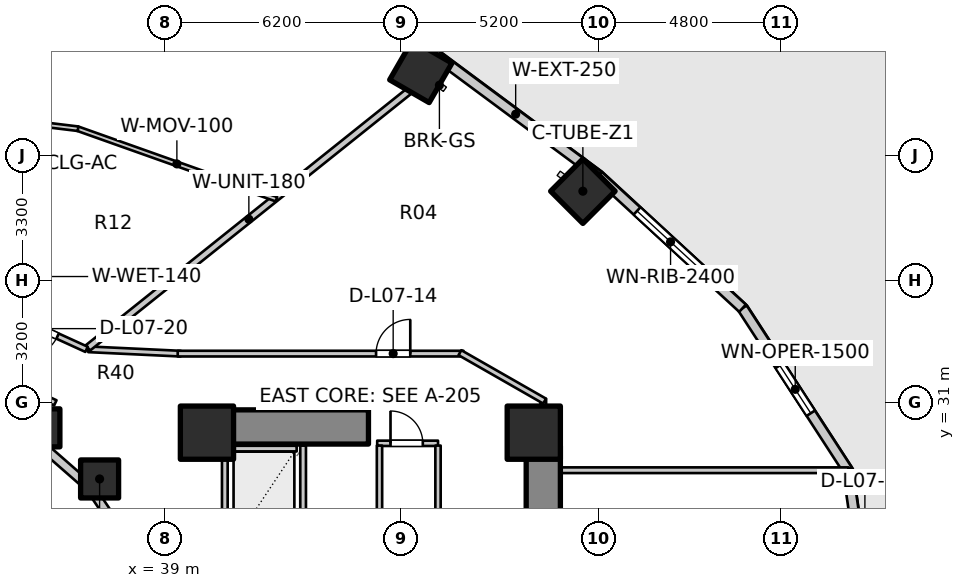
"""IFC4 building model, lengths in metres.
Left out: names, types, materials, properties, quantities, classifications, styles, units other than length and angle.
Written with IfcOpenShell. Run it as: python <this file> out.ifc"""

import sys

from ifc_helpers import new_model, si_unit, direction, frame, frame_2d, origin, origin_2d, place, context, subcontext, project, spatial, rectangle, extrude, element, fill, save


model = new_model("IFC4")
c1 = context("Model", 3, precision=1e-05, world=origin(), true_north=direction((0.0, 1.0)))
c2 = subcontext(c1, "Body", "Model", "MODEL_VIEW")
j1 = project(units=[si_unit("LENGTHUNIT", "METRE"), si_unit("PLANEANGLEUNIT", "RADIAN")], contexts=[c1])
p1 = place(None, origin())
s1 = spatial("IfcSite", under=j1, at=p1, CompositionType="ELEMENT")
p2 = place(p1, origin())
s2 = spatial("IfcBuilding", under=s1, at=p2, CompositionType="ELEMENT")
p3 = place(p2, frame((0.0, 0.0, 27.6)))
s3 = spatial("IfcBuildingStorey", under=s2, at=p3, CompositionType="ELEMENT", Elevation=27.6)
p4 = place(p3, frame((48.95, 17.05, 0.0), z_axis=(0.0, 0.0, 1.0), x_axis=(0.0, 1.0, 0.0)))
e1 = element("IfcWall", 1, at=p4, inside=s3, PredefinedType="SHEAR", context=c2, shape_type="SweptSolid", body=[
    extrude(rectangle(XDim=12.8, YDim=0.9, at=frame_2d((6.4, 0.0))), origin(), (0.0, 0.0, 1.0), 3.1),
])
p5 = place(p3, frame((39.85, 30.35, 0.0), z_axis=(0.0, 0.0, 1.0), x_axis=(1.0, 0.0, 0.0)))
e2 = element("IfcWall", 2, at=p5, inside=s3, PredefinedType="SHEAR", context=c2, shape_type="SweptSolid", body=[
    extrude(rectangle(XDim=4.5, YDim=0.9, at=frame_2d((2.25, 0.0))), origin(), (0.0, 0.0, 1.0), 3.1),
])
for number, where, z_axis, x_axis in (
    (3, (48.7, 30.2, 0.0), (0.0, 0.0, 1.0), (1.0, 0.0, 0.0)),
    (4, (40.1, 30.2, 0.0), (0.0, 0.0, 1.0), (1.0, 0.0, 0.0)),
):
    element("IfcColumn", number, at=place(p3, frame(where, z_axis=z_axis, x_axis=x_axis)), inside=s3, PredefinedType="COLUMN", context=c2, shape_type="SweptSolid", body=[
        extrude(rectangle(XDim=1.4, YDim=1.4, at=origin_2d()), origin(), (0.0, 0.0, 1.0), 3.1),
    ])
p6 = place(p3, frame((37.275, 28.982, 0.0), z_axis=(0.0, 0.0, 1.0), x_axis=(1.0, 0.0, 0.0)))
e5 = element("IfcColumn", 5, at=p6, inside=s3, PredefinedType="COLUMN", context=c2, shape_type="SweptSolid", body=[
    extrude(rectangle(XDim=1.0, YDim=1.0, at=origin_2d()), origin(), (0.0, 0.0, 1.0), 3.1),
])
p7 = place(p3, frame((49.992, 36.554, 0.0), z_axis=(0.0, 0.0, 1.0), x_axis=(0.707106781187, 0.707106781187, 0.0)))
e6 = element("IfcColumn", 6, at=p7, inside=s3, PredefinedType="COLUMN", context=c2, shape_type="SweptSolid", body=[
    extrude(rectangle(XDim=1.2, YDim=1.2, at=origin_2d()), origin(), (0.0, 0.0, 1.0), 3.1),
])
p8 = place(p3, frame((35.73, 30.327, 0.0), z_axis=(0.0, 0.0, 1.0), x_axis=(1.0, 0.0, 0.0)))
e7 = element("IfcColumn", 7, at=p8, inside=s3, PredefinedType="COLUMN", context=c2, shape_type="SweptSolid", body=[
    extrude(rectangle(XDim=1.0, YDim=1.0, at=origin_2d()), origin(), (0.0, 0.0, 1.0), 3.1),
])
p9 = place(p3, frame((45.727, 39.704, 0.0), z_axis=(0.0, 0.0, 1.0), x_axis=(0.5, 0.866025403784, 0.0)))
e8 = element("IfcColumn", 8, at=p9, inside=s3, PredefinedType="COLUMN", context=c2, shape_type="SweptSolid", body=[
    extrude(rectangle(XDim=1.2, YDim=1.2, at=origin_2d()), origin(), (0.0, 0.0, 1.0), 3.1),
])
p10 = place(p3, frame((38.166, 27.06, 0.0), z_axis=(0.0, 0.0, 1.0), x_axis=(-0.558197800898, 0.829707909492, 0.0)))
e9 = element("IfcWall", 9, at=p10, inside=s3, PredefinedType="STANDARD", context=c2, shape_type="SweptSolid", body=[
    extrude(rectangle(XDim=2.027, YDim=0.23, at=frame_2d((1.013, 0.0))), origin(), (0.0, 0.0, 1.0), 2.16),
])
p11 = place(p3, frame((37.035, 28.742, 0.0), z_axis=(0.0, 0.0, 1.0), x_axis=(-0.752576694707, 0.658504607869, 0.0)))
e10 = element("IfcWall", 10, at=p11, inside=s3, PredefinedType="STANDARD", context=c2, shape_type="SweptSolid", body=[
    extrude(rectangle(XDim=1.959, YDim=0.23, at=frame_2d((0.98, 0.0))), origin(), (0.0, 0.0, 1.0), 2.16),
])
p12 = place(p3, frame((57.86, 23.0, 0.0), z_axis=(0.0, 0.0, 1.0), x_axis=(-0.142528001686, 0.989790770181, 0.0)))
e11 = element("IfcWall", 11, at=p12, inside=s3, PredefinedType="STANDARD", context=c2, shape_type="SweptSolid", body=[
    extrude(rectangle(XDim=6.269, YDim=0.26, at=frame_2d((3.135, 0.0))), origin(), (0.0, 0.0, 1.0), 2.88),
])
p13 = place(p12, frame((2.235, 0.0, 0.0)))
e12 = element("IfcOpeningElement", 12, at=p13, cuts=e11, PredefinedType="OPENING", context=c2, shape_type="SweptSolid", body=[
    extrude(rectangle(XDim=1.8, YDim=2.35, at=frame_2d((0.9, 1.175))), frame((0.0, 0.14, 0.0), z_axis=(0.0, -1.0, 0.0), x_axis=(1.0, 0.0, 0.0)), (0.0, 0.0, 1.0), 0.28),
])
p14 = place(p3, frame((56.967, 29.205, 0.0), z_axis=(0.0, 0.0, 1.0), x_axis=(-0.544578722263, 0.838709732421, 0.0)))
e13 = element("IfcWall", 13, at=p14, inside=s3, PredefinedType="STANDARD", context=c2, shape_type="SweptSolid", body=[
    extrude(rectangle(XDim=5.092, YDim=0.26, at=frame_2d((2.546, 0.0))), origin(), (0.0, 0.0, 1.0), 2.85),
])
p15 = place(p14, frame((1.796, 0.0, 0.75)))
e14 = element("IfcOpeningElement", 14, at=p15, cuts=e13, PredefinedType="OPENING", context=c2, shape_type="SweptSolid", body=[
    extrude(rectangle(XDim=1.5, YDim=1.6, at=frame_2d((0.75, 0.8))), frame((0.0, 0.14, 0.0), z_axis=(0.0, -1.0, 0.0), x_axis=(1.0, 0.0, 0.0)), (0.0, 0.0, 1.0), 0.28),
])
p16 = place(p3, frame((54.194, 33.476, 0.0), z_axis=(0.0, 0.0, 1.0), x_axis=(-0.735655109293, 0.67735630223, 0.0)))
e15 = element("IfcWall", 15, at=p16, inside=s3, PredefinedType="STANDARD", context=c2, shape_type="SweptSolid", body=[
    extrude(rectangle(XDim=5.151, YDim=0.26, at=frame_2d((2.575, 0.0))), origin(), (0.0, 0.0, 1.0), 2.85),
])
p17 = place(p16, frame((1.375, 0.0, 0.75)))
e16 = element("IfcOpeningElement", 16, at=p17, cuts=e15, PredefinedType="OPENING", context=c2, shape_type="SweptSolid", body=[
    extrude(rectangle(XDim=2.4, YDim=1.7, at=frame_2d((1.2, 0.85))), frame((0.0, 0.14, 0.0), z_axis=(0.0, -1.0, 0.0), x_axis=(1.0, 0.0, 0.0)), (0.0, 0.0, 1.0), 0.28),
])
p18 = place(p3, frame((50.405, 36.965, 0.0), z_axis=(0.0, 0.0, 1.0), x_axis=(-0.803477531792, 0.595335078679, 0.0)))
e17 = element("IfcWall", 17, at=p18, inside=s3, PredefinedType="STANDARD", context=c2, shape_type="SweptSolid", body=[
    extrude(rectangle(XDim=5.43, YDim=0.26, at=frame_2d((2.715, 0.0))), origin(), (0.0, 0.0, 1.0), 2.85),
])
p19 = place(p3, frame((46.042, 40.197, 0.0), z_axis=(0.0, 0.0, 1.0), x_axis=(-0.919612132394, 0.39282760335, 0.0)))
e18 = element("IfcWall", 18, at=p19, inside=s3, PredefinedType="STANDARD", context=c2, shape_type="SweptSolid", body=[
    extrude(rectangle(XDim=6.209, YDim=0.26, at=frame_2d((3.105, 0.0))), origin(), (0.0, 0.0, 1.0), 2.85),
])
p20 = place(p19, frame((2.355, 0.0, 0.75)))
e19 = element("IfcOpeningElement", 19, at=p20, cuts=e18, PredefinedType="OPENING", context=c2, shape_type="SweptSolid", body=[
    extrude(rectangle(XDim=1.5, YDim=1.6, at=frame_2d((0.75, 0.8))), frame((0.0, 0.14, 0.0), z_axis=(0.0, -1.0, 0.0), x_axis=(1.0, 0.0, 0.0)), (0.0, 0.0, 1.0), 0.28),
])
p21 = place(p3, frame((40.74, 29.78, 0.0), z_axis=(0.0, 0.0, 1.0), x_axis=(1.0, 0.0, 0.0)))
e20 = element("IfcWall", 20, at=p21, inside=s3, PredefinedType="SOLIDWALL", context=c2, shape_type="SweptSolid", body=[
    extrude(rectangle(XDim=1.72, YDim=0.15, at=frame_2d((0.86, 0.0))), origin(), (0.0, 0.0, 1.0), 2.855),
])
for number, where, z_axis, x_axis in (
    (21, (40.57, 27.14, 0.0), (0.0, 0.0, 1.0), (0.0, 1.0, 0.0)),
    (22, (42.63, 27.14, 0.0), (0.0, 0.0, 1.0), (0.0, 1.0, 0.0)),
):
    element("IfcWall", number, at=place(p3, frame(where, z_axis=z_axis, x_axis=x_axis)), inside=s3, PredefinedType="SOLIDWALL", context=c2, shape_type="SweptSolid", body=[
        extrude(rectangle(XDim=2.72, YDim=0.15, at=frame_2d((1.36, 0.0))), origin(), (0.0, 0.0, 1.0), 2.855),
    ])
p22 = place(p3, frame((44.58, 29.92, 0.0), z_axis=(0.0, 0.0, 1.0), x_axis=(1.0, 0.0, 0.0)))
e23 = element("IfcWall", 23, at=p22, inside=s3, PredefinedType="PLUMBINGWALL", context=c2, shape_type="SweptSolid", body=[
    extrude(rectangle(XDim=1.6, YDim=0.14, at=frame_2d((0.8, 0.0))), origin(), (0.0, 0.0, 1.0), 2.855),
])
p23 = place(p22, frame((0.35, 0.0, 0.0)))
e24 = element("IfcOpeningElement", 24, at=p23, cuts=e23, PredefinedType="OPENING", context=c2, shape_type="SweptSolid", body=[
    extrude(rectangle(XDim=0.85, YDim=2.05, at=frame_2d((0.425, 1.025))), frame((0.0, 0.08, 0.0), z_axis=(0.0, -1.0, 0.0), x_axis=(1.0, 0.0, 0.0)), (0.0, 0.0, 1.0), 0.16),
])
for number, where, z_axis, x_axis in (
    (25, (44.64, 25.98, 0.0), (0.0, 0.0, 1.0), (0.0, 1.0, 0.0)),
    (26, (46.18, 25.98, 0.0), (0.0, 0.0, 1.0), (0.0, 1.0, 0.0)),
):
    element("IfcWall", number, at=place(p3, frame(where, z_axis=z_axis, x_axis=x_axis)), inside=s3, PredefinedType="PLUMBINGWALL", context=c2, shape_type="SweptSolid", body=[
        extrude(rectangle(XDim=3.88, YDim=0.14, at=frame_2d((1.94, 0.0))), origin(), (0.0, 0.0, 1.0), 2.855),
    ])
p24 = place(p3, frame((36.11, 30.985, 0.0), z_axis=(0.0, 0.0, 1.0), x_axis=(-0.906943449489, 0.421252393975, 0.0)))
e27 = element("IfcWall", 27, at=p24, inside=s3, PredefinedType="PARTITIONING", context=c2, shape_type="SweptSolid", body=[
    extrude(rectangle(XDim=2.186, YDim=0.15, at=frame_2d((1.093, 0.0))), origin(), (0.0, 0.0, 1.0), 2.237),
])
p25 = place(p3, frame((48.95, 29.212, 0.0), z_axis=(0.0, 0.0, 1.0), x_axis=(1.0, 0.0, 0.0)))
e28 = element("IfcWall", 28, at=p25, inside=s3, PredefinedType="PARTITIONING", context=c2, shape_type="SweptSolid", body=[
    extrude(rectangle(XDim=8.036, YDim=0.15, at=frame_2d((4.018, 0.0))), origin(), (0.0, 0.0, 1.0), 2.855),
])
p26 = place(p3, frame((48.95, 29.8, 0.0), z_axis=(0.0, 0.0, 1.0), x_axis=(0.0, 1.0, 0.0)))
e29 = element("IfcWall", 29, at=p26, inside=s3, PredefinedType="PARTITIONING", context=c2, shape_type="SweptSolid", body=[
    extrude(rectangle(XDim=1.29, YDim=0.15, at=frame_2d((0.645, 0.0))), origin(), (0.0, 0.0, 1.0), 2.069),
])
p27 = place(p3, frame((36.98, 32.394, 0.0), z_axis=(0.0, 0.0, 1.0), x_axis=(0.998877427952, -0.047369651964, 0.0)))
e30 = element("IfcWall", 30, at=p27, inside=s3, PredefinedType="PARTITIONING", context=c2, shape_type="SweptSolid", body=[
    extrude(rectangle(XDim=2.433, YDim=0.15, at=frame_2d((1.216, 0.0))), origin(), (0.0, 0.0, 1.0), 2.237),
])
p28 = place(p3, frame((39.33, 32.28, 0.0), z_axis=(0.0, 0.0, 1.0), x_axis=(1.0, 0.0, 0.0)))
e31 = element("IfcWall", 31, at=p28, inside=s3, PredefinedType="PARTITIONING", context=c2, shape_type="SweptSolid", body=[
    extrude(rectangle(XDim=7.52, YDim=0.15, at=frame_2d((3.76, 0.0))), origin(), (0.0, 0.0, 1.0), 2.237),
])
p29 = place(p28, frame((5.22, 0.0, 0.0)))
e32 = element("IfcOpeningElement", 32, at=p29, cuts=e31, PredefinedType="OPENING", context=c2, shape_type="SweptSolid", body=[
    extrude(rectangle(XDim=0.9, YDim=2.1, at=frame_2d((0.45, 1.05))), frame((0.0, 0.085, 0.0), z_axis=(0.0, -1.0, 0.0), x_axis=(1.0, 0.0, 0.0)), (0.0, 0.0, 1.0), 0.17),
])
p30 = place(p3, frame((46.757, 32.305, 0.0), z_axis=(0.0, 0.0, 1.0), x_axis=(0.867991349648, -0.496579315857, 0.0)))
e33 = element("IfcWall", 33, at=p30, inside=s3, PredefinedType="PARTITIONING", context=c2, shape_type="SweptSolid", body=[
    extrude(rectangle(XDim=2.567, YDim=0.15, at=frame_2d((1.283, 0.0))), origin(), (0.0, 0.0, 1.0), 2.069),
])
p31 = place(p3, frame((36.968, 32.431, 0.0), z_axis=(0.0, 0.0, 1.0), x_axis=(0.781055486744, 0.624461629428, 0.0)))
e34 = element("IfcWall", 34, at=p31, inside=s3, PredefinedType="PARTITIONING", context=c2, shape_type="SweptSolid", body=[
    extrude(rectangle(XDim=10.843, YDim=0.18, at=frame_2d((5.422, 0.0))), origin(), (0.0, 0.0, 1.0), 2.237),
])
p32 = place(p3, frame((41.928, 36.342, 0.0), z_axis=(0.0, 0.0, 1.0), x_axis=(-0.942369240096, 0.334574678243, 0.0)))
e35 = element("IfcWall", 35, at=p32, inside=s3, PredefinedType="MOVABLE", context=c2, shape_type="SweptSolid", body=[
    extrude(rectangle(XDim=5.559, YDim=0.12, at=frame_2d((2.779, 0.0))), origin(), (0.0, 0.0, 1.0), 2.237),
])
p33 = place(p3, frame((36.708, 38.197, 0.0), z_axis=(0.0, 0.0, 1.0), x_axis=(-0.992699076447, 0.120617343785, 0.0)))
e36 = element("IfcWall", 36, at=p33, inside=s3, PredefinedType="MOVABLE", context=c2, shape_type="SweptSolid", body=[
    extrude(rectangle(XDim=4.793, YDim=0.12, at=frame_2d((2.396, 0.0))), origin(), (0.0, 0.0, 1.0), 2.237),
])
p34 = place(p33, frame((1.922, 0.0, 0.0)))
e37 = element("IfcOpeningElement", 37, at=p34, cuts=e36, PredefinedType="OPENING", context=c2, shape_type="SweptSolid", body=[
    extrude(rectangle(XDim=0.95, YDim=2.1, at=frame_2d((0.475, 1.05))), frame((0.0, 0.07, 0.0), z_axis=(0.0, -1.0, 0.0), x_axis=(1.0, 0.0, 0.0)), (0.0, 0.0, 1.0), 0.14),
])
p35 = place(p3, frame((36.931, 32.393, 0.0), z_axis=(0.0, 0.0, 1.0), x_axis=(-0.909747571199, 0.415161843982, 0.0)))
e38 = element("IfcWall", 38, at=p35, inside=s3, PredefinedType="PARTITIONING", context=c2, shape_type="SweptSolid", body=[
    extrude(rectangle(XDim=2.625, YDim=0.15, at=frame_2d((1.312, 0.0))), origin(), (0.0, 0.0, 1.0), 2.237),
])
p36 = place(p35, frame((0.838, 0.0, 0.0)))
e39 = element("IfcOpeningElement", 39, at=p36, cuts=e38, PredefinedType="OPENING", context=c2, shape_type="SweptSolid", body=[
    extrude(rectangle(XDim=0.95, YDim=2.1, at=frame_2d((0.475, 1.05))), frame((0.0, 0.085, 0.0), z_axis=(0.0, -1.0, 0.0), x_axis=(1.0, 0.0, 0.0)), (0.0, 0.0, 1.0), 0.17),
])
p37 = place(p15, origin())
e40 = element("IfcWindow", 40, at=p37, inside=s3, PartitioningType="SINGLE_PANEL", PredefinedType="WINDOW", context=c2, shape_type="SweptSolid", body=[
    extrude(rectangle(XDim=1.5, YDim=1.6, at=frame_2d((0.75, 0.8))), frame((0.0, 0.03, 0.0), z_axis=(0.0, -1.0, 0.0), x_axis=(1.0, 0.0, 0.0)), (0.0, 0.0, 1.0), 0.06),
])
fill(e14, e40)
p38 = place(p17, origin())
e41 = element("IfcWindow", 41, at=p38, inside=s3, PartitioningType="SINGLE_PANEL", PredefinedType="WINDOW", context=c2, shape_type="SweptSolid", body=[
    extrude(rectangle(XDim=2.4, YDim=1.7, at=frame_2d((1.2, 0.85))), frame((0.0, 0.03, 0.0), z_axis=(0.0, -1.0, 0.0), x_axis=(1.0, 0.0, 0.0)), (0.0, 0.0, 1.0), 0.06),
])
fill(e16, e41)
p39 = place(p23, origin())
e42 = element("IfcDoor", 42, at=p39, inside=s3, OperationType="SINGLE_SWING_LEFT", PredefinedType="DOOR", context=c2, shape_type="SweptSolid", body=[
    extrude(rectangle(XDim=0.85, YDim=2.05, at=frame_2d((0.425, 1.025))), frame((0.0, 0.025, 0.0), z_axis=(0.0, -1.0, 0.0), x_axis=(1.0, 0.0, 0.0)), (0.0, 0.0, 1.0), 0.05),
])
fill(e24, e42)
p40 = place(p29, origin())
e43 = element("IfcDoor", 43, at=p40, inside=s3, OperationType="SINGLE_SWING_RIGHT", PredefinedType="DOOR", context=c2, shape_type="SweptSolid", body=[
    extrude(rectangle(XDim=0.9, YDim=2.1, at=frame_2d((0.45, 1.05))), frame((0.0, 0.025, 0.0), z_axis=(0.0, -1.0, 0.0), x_axis=(1.0, 0.0, 0.0)), (0.0, 0.0, 1.0), 0.05),
])
fill(e32, e43)
p41 = place(p36, origin())
e44 = element("IfcDoor", 44, at=p41, inside=s3, OperationType="SINGLE_SWING_RIGHT", PredefinedType="DOOR", context=c2, shape_type="SweptSolid", body=[
    extrude(rectangle(XDim=0.95, YDim=2.1, at=frame_2d((0.475, 1.05))), frame((0.0, 0.025, 0.0), z_axis=(0.0, -1.0, 0.0), x_axis=(1.0, 0.0, 0.0)), (0.0, 0.0, 1.0), 0.05),
])
fill(e39, e44)
save(model, sys.argv[1])
